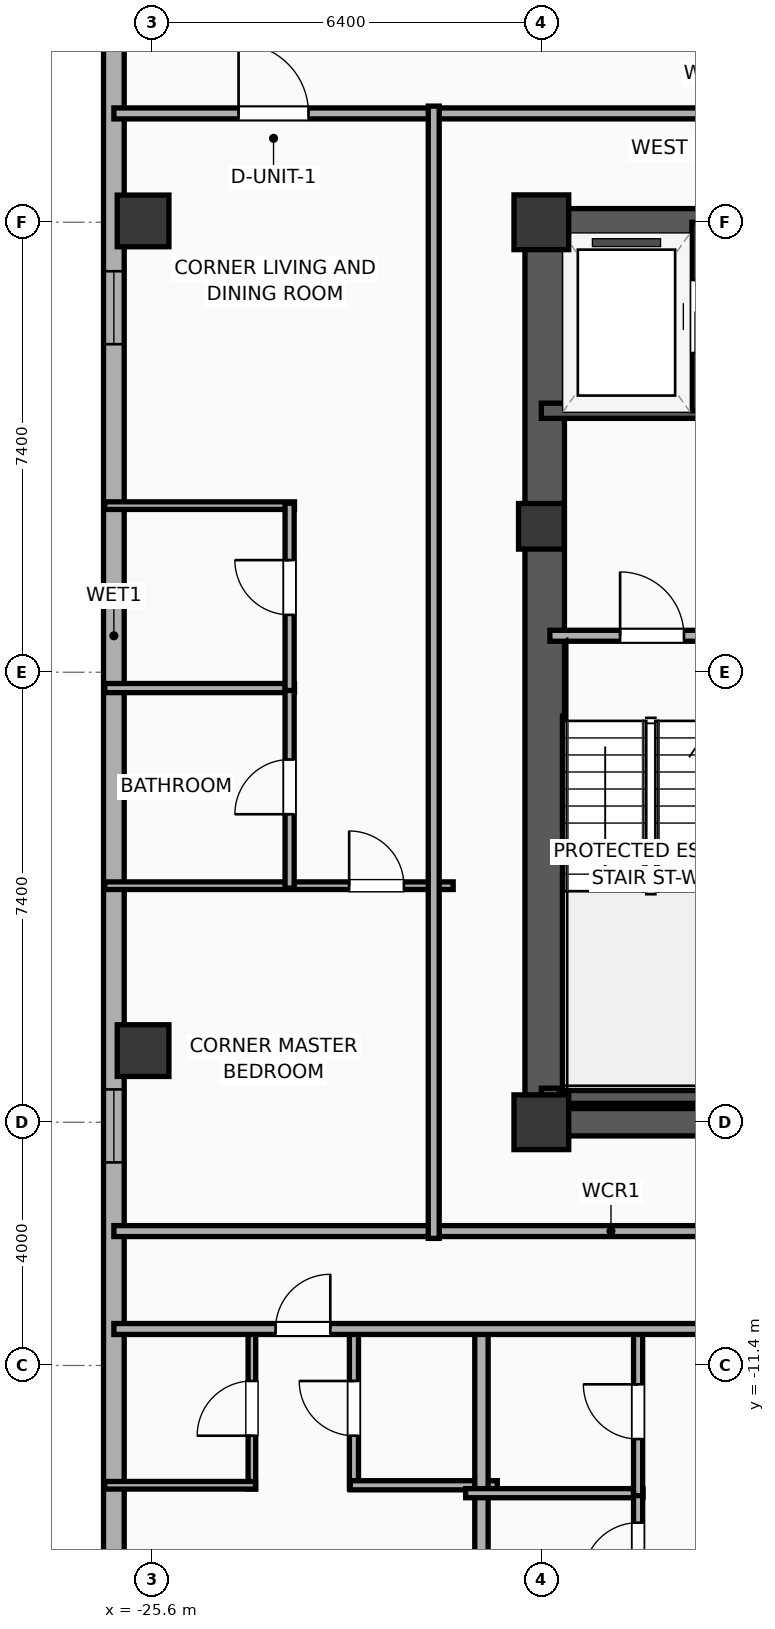
"""IFC4 building model, lengths in metres.
Left out: names, types, materials, properties, quantities, classifications, styles, units other than length and angle.
Written with IfcOpenShell. Run it as: python <this file> out.ifc"""

import sys

from ifc_helpers import new_model, si_unit, direction, frame, frame_2d, origin, origin_2d, place, context, subcontext, project, spatial, rectangle, hollow_rectangle, extrude, element, fill, save


model = new_model("IFC4")
c1 = context("Model", 3, precision=1e-05, world=origin(), true_north=direction((0.0, 1.0)))
c2 = subcontext(c1, "Body", "Model", "MODEL_VIEW")
j1 = project(units=[si_unit("LENGTHUNIT", "METRE"), si_unit("PLANEANGLEUNIT", "RADIAN")], contexts=[c1])
p1 = place(None, origin())
s1 = spatial("IfcSite", under=j1, at=p1, CompositionType="ELEMENT")
p2 = place(p1, origin())
s2 = spatial("IfcBuilding", under=s1, at=p2, CompositionType="ELEMENT")
p3 = place(p2, frame((0.0, 0.0, 219.7)))
s3 = spatial("IfcBuildingStorey", under=s2, at=p3, CompositionType="ELEMENT", Elevation=219.7)
p4 = place(p3, frame((-19.2, -7.4, 0.0), z_axis=(0.0, 0.0, 1.0), x_axis=(1.0, 0.0, 0.0)))
e1 = element("IfcColumn", 1, at=p4, inside=s3, PredefinedType="COLUMN", context=c2, shape_type="SweptSolid", body=[
    extrude(rectangle(XDim=0.9, YDim=0.9, at=origin_2d()), origin(), (0.0, 0.0, 1.0), 3.9),
])
p5 = place(p3, frame((-19.2, 2.4, 0.0), z_axis=(0.0, 0.0, 1.0), x_axis=(1.0, 0.0, 0.0)))
e2 = element("IfcColumn", 2, at=p5, inside=s3, PredefinedType="COLUMN", context=c2, shape_type="SweptSolid", body=[
    extrude(rectangle(XDim=0.75, YDim=0.75, at=origin_2d()), origin(), (0.0, 0.0, 1.0), 3.9),
])
p6 = place(p3, frame((-19.2, 7.4, 0.0), z_axis=(0.0, 0.0, 1.0), x_axis=(1.0, 0.0, 0.0)))
e3 = element("IfcColumn", 3, at=p6, inside=s3, PredefinedType="COLUMN", context=c2, shape_type="SweptSolid", body=[
    extrude(rectangle(XDim=0.9, YDim=0.9, at=origin_2d()), origin(), (0.0, 0.0, 1.0), 3.9),
])
for number, where, z_axis, x_axis in (
    (4, (-19.425, -7.4, 0.0), (0.0, 0.0, 1.0), (1.0, 0.0, 0.0)),
    (5, (-19.425, 7.4, 0.0), (0.0, 0.0, 1.0), (1.0, 0.0, 0.0)),
):
    element("IfcWall", number, at=place(p3, frame(where, z_axis=z_axis, x_axis=x_axis)), inside=s3, PredefinedType="SHEAR", context=c2, shape_type="SweptSolid", body=[
        extrude(rectangle(XDim=7.25, YDim=0.45, at=frame_2d((3.625, 0.0))), origin(), (0.0, 0.0, 1.0), 3.65),
    ])
p7 = place(p3, frame((-19.145, -7.4, 0.0), z_axis=(0.0, 0.0, 1.0), x_axis=(0.0, 1.0, 0.0)))
e6 = element("IfcWall", 6, at=p7, inside=s3, PredefinedType="SHEAR", context=c2, shape_type="SweptSolid", body=[
    extrude(rectangle(XDim=14.8, YDim=0.65, at=frame_2d((7.4, 0.0))), origin(), (0.0, 0.0, 1.0), 3.65),
])
p8 = place(p3, frame((-19.2, -6.965, 0.0), z_axis=(0.0, 0.0, 1.0), x_axis=(1.0, 0.0, 0.0)))
e7 = element("IfcWall", 7, at=p8, inside=s3, PredefinedType="SOLIDWALL", context=c2, shape_type="SweptSolid", body=[
    extrude(rectangle(XDim=3.46, YDim=0.25, at=frame_2d((1.73, 0.0))), origin(), (0.0, 0.0, 1.0), 3.65),
])
for number, where, z_axis, x_axis in (
    (8, (-25.75, 7.422, 0.0), (0.0, 0.0, 1.0), (1.0, 0.0, 0.0)),
    (9, (-25.75, -6.222, 0.0), (0.0, 0.0, 1.0), (1.0, 0.0, 0.0)),
):
    element("IfcColumn", number, at=place(p3, frame(where, z_axis=z_axis, x_axis=x_axis)), inside=s3, PredefinedType="COLUMN", context=c2, shape_type="SweptSolid", body=[
        extrude(hollow_rectangle(XDim=0.85, YDim=0.85, WallThickness=0.028, at=origin_2d()), origin(), (0.0, 0.0, 1.0), 3.9),
    ])
p9 = place(p3, frame((-26.23, -15.383, 0.0), z_axis=(0.0, 0.0, 1.0), x_axis=(0.0, 1.0, 0.0)))
e10 = element("IfcWall", 10, at=p9, inside=s3, PredefinedType="ELEMENTEDWALL", context=c2, shape_type="SweptSolid", body=[
    extrude(rectangle(XDim=31.967, YDim=0.34, at=frame_2d((15.983, 0.0))), origin(), (0.0, 0.0, 1.0), 3.65),
])
p10 = place(p9, frame((29.55, 0.0, 0.75)))
e11 = element("IfcOpeningElement", 11, at=p10, cuts=e10, PredefinedType="OPENING", context=c2, shape_type="SweptSolid", body=[
    extrude(rectangle(XDim=1.2, YDim=2.05, at=frame_2d((0.6, 1.025))), frame((0.0, 0.18, 0.0), z_axis=(0.0, -1.0, 0.0), x_axis=(1.0, 0.0, 0.0)), (0.0, 0.0, 1.0), 0.36),
])
p11 = place(p9, frame((20.778, 0.0, 0.75)))
e12 = element("IfcOpeningElement", 12, at=p11, cuts=e10, PredefinedType="OPENING", context=c2, shape_type="SweptSolid", body=[
    extrude(rectangle(XDim=1.2, YDim=2.05, at=frame_2d((0.6, 1.025))), frame((0.0, 0.18, 0.0), z_axis=(0.0, -1.0, 0.0), x_axis=(1.0, 0.0, 0.0)), (0.0, 0.0, 1.0), 0.36),
])
p12 = place(p9, frame((7.323, 0.0, 0.75)))
e13 = element("IfcOpeningElement", 13, at=p12, cuts=e10, PredefinedType="OPENING", context=c2, shape_type="SweptSolid", body=[
    extrude(rectangle(XDim=1.2, YDim=2.05, at=frame_2d((0.6, 1.025))), frame((0.0, 0.18, 0.0), z_axis=(0.0, -1.0, 0.0), x_axis=(1.0, 0.0, 0.0)), (0.0, 0.0, 1.0), 0.36),
])
p13 = place(p3, frame((-19.2, 4.3, 0.0), z_axis=(0.0, 0.0, 1.0), x_axis=(1.0, 0.0, 0.0)))
e14 = element("IfcWall", 14, at=p13, inside=s3, PredefinedType="SOLIDWALL", context=c2, shape_type="SweptSolid", body=[
    extrude(rectangle(XDim=2.6, YDim=0.25, at=frame_2d((1.3, 0.0))), origin(), (0.0, 0.0, 1.0), 3.65),
])
p14 = place(p3, frame((-16.6, 4.3, 0.0), z_axis=(0.0, 0.0, 1.0), x_axis=(0.0, 1.0, 0.0)))
e15 = element("IfcWall", 15, at=p14, inside=s3, PredefinedType="SOLIDWALL", context=c2, shape_type="SweptSolid", body=[
    extrude(rectangle(XDim=3.1, YDim=0.25, at=frame_2d((1.55, 0.0))), origin(), (0.0, 0.0, 1.0), 3.65),
])
p15 = place(p14, frame((0.95, 0.0, 0.0)))
e16 = element("IfcOpeningElement", 16, at=p15, cuts=e15, PredefinedType="OPENING", context=c2, shape_type="SweptSolid", body=[
    extrude(rectangle(XDim=1.2, YDim=2.05, at=frame_2d((0.6, 1.025))), frame((0.0, 0.135, 0.0), z_axis=(0.0, -1.0, 0.0), x_axis=(1.0, 0.0, 0.0)), (0.0, 0.0, 1.0), 0.27),
])
p16 = place(p3, frame((-19.06, 0.6, 0.0), z_axis=(0.0, 0.0, 1.0), x_axis=(1.0, 0.0, 0.0)))
e17 = element("IfcWall", 17, at=p16, inside=s3, PredefinedType="PARTITIONING", context=c2, shape_type="SweptSolid", body=[
    extrude(rectangle(XDim=3.36, YDim=0.18, at=frame_2d((1.68, 0.0))), origin(), (0.0, 0.0, 1.0), 3.65),
])
p17 = place(p16, frame((1.155, 0.0, 0.0)))
e18 = element("IfcOpeningElement", 18, at=p17, cuts=e17, PredefinedType="OPENING", context=c2, shape_type="SweptSolid", body=[
    extrude(rectangle(XDim=1.05, YDim=2.05, at=frame_2d((0.525, 1.025))), frame((0.0, 0.1, 0.0), z_axis=(0.0, -1.0, 0.0), x_axis=(1.0, 0.0, 0.0)), (0.0, 0.0, 1.0), 0.2),
])
p18 = place(p3, frame((-26.23, 9.19, 0.0), z_axis=(0.0, 0.0, 1.0), x_axis=(1.0, 0.0, 0.0)))
e19 = element("IfcWall", 19, at=p18, inside=s3, PredefinedType="PARTITIONING", context=c2, shape_type="SweptSolid", body=[
    extrude(rectangle(XDim=16.35, YDim=0.18, at=frame_2d((8.175, 0.0))), origin(), (0.0, 0.0, 1.0), 3.65),
])
p19 = place(p18, frame((2.051, 0.0, 0.0)))
e20 = element("IfcOpeningElement", 20, at=p19, cuts=e19, PredefinedType="OPENING", context=c2, shape_type="SweptSolid", body=[
    extrude(rectangle(XDim=1.15, YDim=2.05, at=frame_2d((0.575, 1.025))), frame((0.0, 0.1, 0.0), z_axis=(0.0, -1.0, 0.0), x_axis=(1.0, 0.0, 0.0)), (0.0, 0.0, 1.0), 0.2),
])
p20 = place(p3, frame((-26.23, -9.19, 0.0), z_axis=(0.0, 0.0, 1.0), x_axis=(1.0, 0.0, 0.0)))
e21 = element("IfcWall", 21, at=p20, inside=s3, PredefinedType="PARTITIONING", context=c2, shape_type="SweptSolid", body=[
    extrude(rectangle(XDim=16.35, YDim=0.18, at=frame_2d((8.175, 0.0))), origin(), (0.0, 0.0, 1.0), 3.65),
])
p21 = place(p3, frame((-23.96, -13.43, 0.0), z_axis=(0.0, 0.0, 1.0), x_axis=(0.0, 1.0, 0.0)))
e22 = element("IfcWall", 22, at=p21, inside=s3, PredefinedType="PARTITIONING", context=c2, shape_type="SweptSolid", body=[
    extrude(rectangle(XDim=2.65, YDim=0.125, at=frame_2d((1.325, 0.0))), origin(), (0.0, 0.0, 1.0), 3.65),
])
p22 = place(p21, frame((0.875, 0.0, 0.0)))
e23 = element("IfcOpeningElement", 23, at=p22, cuts=e22, PredefinedType="OPENING", context=c2, shape_type="SweptSolid", body=[
    extrude(rectangle(XDim=0.9, YDim=2.05, at=frame_2d((0.45, 1.025))), frame((0.0, 0.073, 0.0), z_axis=(0.0, -1.0, 0.0), x_axis=(1.0, 0.0, 0.0)), (0.0, 0.0, 1.0), 0.145),
])
p23 = place(p3, frame((-22.282, -13.43, 0.0), z_axis=(0.0, 0.0, 1.0), x_axis=(0.0, 1.0, 0.0)))
e24 = element("IfcWall", 24, at=p23, inside=s3, PredefinedType="PLUMBINGWALL", context=c2, shape_type="SweptSolid", body=[
    extrude(rectangle(XDim=2.65, YDim=0.15, at=frame_2d((1.325, 0.0))), origin(), (0.0, 0.0, 1.0), 3.65),
])
p24 = place(p23, frame((0.875, 0.0, 0.0)))
e25 = element("IfcOpeningElement", 25, at=p24, cuts=e24, PredefinedType="OPENING", context=c2, shape_type="SweptSolid", body=[
    extrude(rectangle(XDim=0.9, YDim=2.05, at=frame_2d((0.45, 1.025))), frame((0.0, 0.085, 0.0), z_axis=(0.0, -1.0, 0.0), x_axis=(1.0, 0.0, 0.0)), (0.0, 0.0, 1.0), 0.17),
])
p25 = place(p3, frame((-26.38, -13.37, 0.0), z_axis=(0.0, 0.0, 1.0), x_axis=(1.0, 0.0, 0.0)))
e26 = element("IfcWall", 26, at=p25, inside=s3, PredefinedType="PARTITIONING", context=c2, shape_type="SweptSolid", body=[
    extrude(rectangle(XDim=2.48, YDim=0.125, at=frame_2d((1.24, 0.0))), origin(), (0.0, 0.0, 1.0), 3.65),
])
p26 = place(p3, frame((-22.342, -13.37, 0.0), z_axis=(0.0, 0.0, 1.0), x_axis=(1.0, 0.0, 0.0)))
e27 = element("IfcWall", 27, at=p26, inside=s3, PredefinedType="PLUMBINGWALL", context=c2, shape_type="SweptSolid", body=[
    extrude(rectangle(XDim=2.417, YDim=0.15, at=frame_2d((1.208, 0.0))), origin(), (0.0, 0.0, 1.0), 3.65),
])
p27 = place(p3, frame((-20.185, -18.83, 0.0), z_axis=(0.0, 0.0, 1.0), x_axis=(0.0, 1.0, 0.0)))
e28 = element("IfcWall", 28, at=p27, inside=s3, PredefinedType="PARTITIONING", context=c2, shape_type="SweptSolid", body=[
    extrude(rectangle(XDim=8.11, YDim=0.22, at=frame_2d((4.055, 0.0))), origin(), (0.0, 0.0, 1.0), 3.09),
])
p28 = place(p3, frame((-20.445, -13.5, 0.0), z_axis=(0.0, 0.0, 1.0), x_axis=(1.0, 0.0, 0.0)))
e29 = element("IfcWall", 29, at=p28, inside=s3, PredefinedType="PLUMBINGWALL", context=c2, shape_type="SweptSolid", body=[
    extrude(rectangle(XDim=2.916, YDim=0.15, at=frame_2d((1.458, 0.0))), origin(), (0.0, 0.0, 1.0), 3.65),
])
p29 = place(p3, frame((-17.609, -18.877, 0.0), z_axis=(0.0, 0.0, 1.0), x_axis=(0.0, 1.0, 0.0)))
e30 = element("IfcWall", 30, at=p29, inside=s3, PredefinedType="PLUMBINGWALL", context=c2, shape_type="SweptSolid", body=[
    extrude(rectangle(XDim=5.417, YDim=0.15, at=frame_2d((2.708, 0.0))), origin(), (0.0, 0.0, 1.0), 3.65),
])
p30 = place(p29, frame((3.992, 0.0, 0.0)))
e31 = element("IfcOpeningElement", 31, at=p30, cuts=e30, PredefinedType="OPENING", context=c2, shape_type="SweptSolid", body=[
    extrude(rectangle(XDim=0.9, YDim=2.05, at=frame_2d((0.45, 1.025))), frame((0.0, 0.085, 0.0), z_axis=(0.0, -1.0, 0.0), x_axis=(1.0, 0.0, 0.0)), (0.0, 0.0, 1.0), 0.17),
])
p31 = place(p3, frame((-17.609, -13.54, 0.0), z_axis=(0.0, 0.0, 1.0), x_axis=(0.0, 1.0, 0.0)))
e32 = element("IfcWall", 32, at=p31, inside=s3, PredefinedType="PLUMBINGWALL", context=c2, shape_type="SweptSolid", body=[
    extrude(rectangle(XDim=2.76, YDim=0.15, at=frame_2d((1.38, 0.0))), origin(), (0.0, 0.0, 1.0), 3.65),
])
p32 = place(p31, frame((0.93, 0.0, 0.0)))
e33 = element("IfcOpeningElement", 33, at=p32, cuts=e32, PredefinedType="OPENING", context=c2, shape_type="SweptSolid", body=[
    extrude(rectangle(XDim=0.9, YDim=2.05, at=frame_2d((0.45, 1.025))), frame((0.0, 0.085, 0.0), z_axis=(0.0, -1.0, 0.0), x_axis=(1.0, 0.0, 0.0)), (0.0, 0.0, 1.0), 0.17),
])
p33 = place(p3, frame((-26.23, -10.8, 0.0), z_axis=(0.0, 0.0, 1.0), x_axis=(1.0, 0.0, 0.0)))
e34 = element("IfcWall", 34, at=p33, inside=s3, PredefinedType="PARTITIONING", context=c2, shape_type="SweptSolid", body=[
    extrude(rectangle(XDim=18.15, YDim=0.18, at=frame_2d((9.075, 0.0))), origin(), (0.0, 0.0, 1.0), 3.65),
])
p34 = place(p33, frame((2.659, 0.0, 0.0)))
e35 = element("IfcOpeningElement", 35, at=p34, cuts=e34, PredefinedType="OPENING", context=c2, shape_type="SweptSolid", body=[
    extrude(rectangle(XDim=0.9, YDim=2.05, at=frame_2d((0.45, 1.025))), frame((0.0, 0.1, 0.0), z_axis=(0.0, -1.0, 0.0), x_axis=(1.0, 0.0, 0.0)), (0.0, 0.0, 1.0), 0.2),
])
p35 = place(p33, frame((9.754, 0.0, 0.0)))
e36 = element("IfcOpeningElement", 36, at=p35, cuts=e34, PredefinedType="OPENING", context=c2, shape_type="SweptSolid", body=[
    extrude(rectangle(XDim=1.15, YDim=2.05, at=frame_2d((0.575, 1.025))), frame((0.0, 0.1, 0.0), z_axis=(0.0, -1.0, 0.0), x_axis=(1.0, 0.0, 0.0)), (0.0, 0.0, 1.0), 0.2),
])
p36 = place(p33, frame((14.792, 0.0, 0.0)))
e37 = element("IfcOpeningElement", 37, at=p36, cuts=e34, PredefinedType="OPENING", context=c2, shape_type="SweptSolid", body=[
    extrude(rectangle(XDim=0.9, YDim=2.05, at=frame_2d((0.45, 1.025))), frame((0.0, 0.1, 0.0), z_axis=(0.0, -1.0, 0.0), x_axis=(1.0, 0.0, 0.0)), (0.0, 0.0, 1.0), 0.2),
])
p37 = place(p3, frame((-26.38, 2.74, 0.0), z_axis=(0.0, 0.0, 1.0), x_axis=(1.0, 0.0, 0.0)))
e38 = element("IfcWall", 38, at=p37, inside=s3, PredefinedType="PARTITIONING", context=c2, shape_type="SweptSolid", body=[
    extrude(rectangle(XDim=3.12, YDim=0.125, at=frame_2d((1.56, 0.0))), origin(), (0.0, 0.0, 1.0), 3.65),
])
p38 = place(p3, frame((-26.38, -0.26, 0.0), z_axis=(0.0, 0.0, 1.0), x_axis=(1.0, 0.0, 0.0)))
e39 = element("IfcWall", 39, at=p38, inside=s3, PredefinedType="PLUMBINGWALL", context=c2, shape_type="SweptSolid", body=[
    extrude(rectangle(XDim=3.12, YDim=0.15, at=frame_2d((1.56, 0.0))), origin(), (0.0, 0.0, 1.0), 3.65),
])
p39 = place(p3, frame((-26.38, -3.51, 0.0), z_axis=(0.0, 0.0, 1.0), x_axis=(1.0, 0.0, 0.0)))
e40 = element("IfcWall", 40, at=p39, inside=s3, PredefinedType="PARTITIONING", context=c2, shape_type="SweptSolid", body=[
    extrude(rectangle(XDim=5.73, YDim=0.125, at=frame_2d((2.865, 0.0))), origin(), (0.0, 0.0, 1.0), 3.65),
])
p40 = place(p39, frame((4.019, 0.0, 0.0)))
e41 = element("IfcOpeningElement", 41, at=p40, cuts=e40, PredefinedType="OPENING", context=c2, shape_type="SweptSolid", body=[
    extrude(rectangle(XDim=0.9, YDim=2.05, at=frame_2d((0.45, 1.025))), frame((0.0, 0.073, 0.0), z_axis=(0.0, -1.0, 0.0), x_axis=(1.0, 0.0, 0.0)), (0.0, 0.0, 1.0), 0.145),
])
p41 = place(p3, frame((-23.34, -3.55, 0.0), z_axis=(0.0, 0.0, 1.0), x_axis=(0.0, 1.0, 0.0)))
e42 = element("IfcWall", 42, at=p41, inside=s3, PredefinedType="PLUMBINGWALL", context=c2, shape_type="SweptSolid", body=[
    extrude(rectangle(XDim=3.33, YDim=0.15, at=frame_2d((1.665, 0.0))), origin(), (0.0, 0.0, 1.0), 3.65),
])
p42 = place(p41, frame((1.215, 0.0, 0.0)))
e43 = element("IfcOpeningElement", 43, at=p42, cuts=e42, PredefinedType="OPENING", context=c2, shape_type="SweptSolid", body=[
    extrude(rectangle(XDim=0.9, YDim=2.05, at=frame_2d((0.45, 1.025))), frame((0.0, 0.085, 0.0), z_axis=(0.0, -1.0, 0.0), x_axis=(1.0, 0.0, 0.0)), (0.0, 0.0, 1.0), 0.17),
])
p43 = place(p3, frame((-23.34, -0.3, 0.0), z_axis=(0.0, 0.0, 1.0), x_axis=(0.0, 1.0, 0.0)))
e44 = element("IfcWall", 44, at=p43, inside=s3, PredefinedType="PLUMBINGWALL", context=c2, shape_type="SweptSolid", body=[
    extrude(rectangle(XDim=3.08, YDim=0.15, at=frame_2d((1.54, 0.0))), origin(), (0.0, 0.0, 1.0), 3.65),
])
p44 = place(p43, frame((1.244, 0.0, 0.0)))
e45 = element("IfcOpeningElement", 45, at=p44, cuts=e44, PredefinedType="OPENING", context=c2, shape_type="SweptSolid", body=[
    extrude(rectangle(XDim=0.9, YDim=2.05, at=frame_2d((0.45, 1.025))), frame((0.0, 0.085, 0.0), z_axis=(0.0, -1.0, 0.0), x_axis=(1.0, 0.0, 0.0)), (0.0, 0.0, 1.0), 0.17),
])
p45 = place(p3, frame((-20.97, -9.31, 0.0), z_axis=(0.0, 0.0, 1.0), x_axis=(0.0, 1.0, 0.0)))
e46 = element("IfcWall", 46, at=p45, inside=s3, PredefinedType="PARTITIONING", context=c2, shape_type="SweptSolid", body=[
    extrude(rectangle(XDim=18.62, YDim=0.18, at=frame_2d((9.31, 0.0))), origin(), (0.0, 0.0, 1.0), 3.65),
])
p46 = place(p11, origin())
e47 = element("IfcWindow", 47, at=p46, inside=s3, PartitioningType="SINGLE_PANEL", PredefinedType="WINDOW", context=c2, shape_type="SweptSolid", body=[
    extrude(rectangle(XDim=1.2, YDim=2.05, at=frame_2d((0.6, 1.025))), frame((0.0, 0.03, 0.0), z_axis=(0.0, -1.0, 0.0), x_axis=(1.0, 0.0, 0.0)), (0.0, 0.0, 1.0), 0.06),
])
fill(e12, e47)
p47 = place(p12, origin())
e48 = element("IfcWindow", 48, at=p47, inside=s3, PartitioningType="SINGLE_PANEL", PredefinedType="WINDOW", context=c2, shape_type="SweptSolid", body=[
    extrude(rectangle(XDim=1.2, YDim=2.05, at=frame_2d((0.6, 1.025))), frame((0.0, 0.03, 0.0), z_axis=(0.0, -1.0, 0.0), x_axis=(1.0, 0.0, 0.0)), (0.0, 0.0, 1.0), 0.06),
])
fill(e13, e48)
p48 = place(p17, origin())
e49 = element("IfcDoor", 49, at=p48, inside=s3, OperationType="SINGLE_SWING_LEFT", PredefinedType="DOOR", context=c2, shape_type="SweptSolid", body=[
    extrude(rectangle(XDim=1.05, YDim=2.05, at=frame_2d((0.525, 1.025))), frame((0.0, 0.025, 0.0), z_axis=(0.0, -1.0, 0.0), x_axis=(1.0, 0.0, 0.0)), (0.0, 0.0, 1.0), 0.05),
])
fill(e18, e49)
p49 = place(p19, origin())
e50 = element("IfcDoor", 50, at=p49, inside=s3, OperationType="SINGLE_SWING_LEFT", PredefinedType="DOOR", context=c2, shape_type="SweptSolid", body=[
    extrude(rectangle(XDim=1.15, YDim=2.05, at=frame_2d((0.575, 1.025))), frame((0.0, 0.025, 0.0), z_axis=(0.0, -1.0, 0.0), x_axis=(1.0, 0.0, 0.0)), (0.0, 0.0, 1.0), 0.05),
])
fill(e20, e50)
p50 = place(p22, origin())
e51 = element("IfcDoor", 51, at=p50, inside=s3, OperationType="SINGLE_SWING_LEFT", PredefinedType="DOOR", context=c2, shape_type="SweptSolid", body=[
    extrude(rectangle(XDim=0.9, YDim=2.05, at=frame_2d((0.45, 1.025))), frame((0.0, 0.025, 0.0), z_axis=(0.0, -1.0, 0.0), x_axis=(1.0, 0.0, 0.0)), (0.0, 0.0, 1.0), 0.05),
])
fill(e23, e51)
p51 = place(p24, origin())
e52 = element("IfcDoor", 52, at=p51, inside=s3, OperationType="SINGLE_SWING_RIGHT", PredefinedType="DOOR", context=c2, shape_type="SweptSolid", body=[
    extrude(rectangle(XDim=0.9, YDim=2.05, at=frame_2d((0.45, 1.025))), frame((0.0, 0.025, 0.0), z_axis=(0.0, -1.0, 0.0), x_axis=(1.0, 0.0, 0.0)), (0.0, 0.0, 1.0), 0.05),
])
fill(e25, e52)
p52 = place(p30, origin())
e53 = element("IfcDoor", 53, at=p52, inside=s3, OperationType="SINGLE_SWING_LEFT", PredefinedType="DOOR", context=c2, shape_type="SweptSolid", body=[
    extrude(rectangle(XDim=0.9, YDim=2.05, at=frame_2d((0.45, 1.025))), frame((0.0, 0.025, 0.0), z_axis=(0.0, -1.0, 0.0), x_axis=(1.0, 0.0, 0.0)), (0.0, 0.0, 1.0), 0.05),
])
fill(e31, e53)
p53 = place(p32, origin())
e54 = element("IfcDoor", 54, at=p53, inside=s3, OperationType="SINGLE_SWING_RIGHT", PredefinedType="DOOR", context=c2, shape_type="SweptSolid", body=[
    extrude(rectangle(XDim=0.9, YDim=2.05, at=frame_2d((0.45, 1.025))), frame((0.0, 0.025, 0.0), z_axis=(0.0, -1.0, 0.0), x_axis=(1.0, 0.0, 0.0)), (0.0, 0.0, 1.0), 0.05),
])
fill(e33, e54)
p54 = place(p34, origin())
e55 = element("IfcDoor", 55, at=p54, inside=s3, OperationType="SINGLE_SWING_RIGHT", PredefinedType="DOOR", context=c2, shape_type="SweptSolid", body=[
    extrude(rectangle(XDim=0.9, YDim=2.05, at=frame_2d((0.45, 1.025))), frame((0.0, 0.025, 0.0), z_axis=(0.0, -1.0, 0.0), x_axis=(1.0, 0.0, 0.0)), (0.0, 0.0, 1.0), 0.05),
])
fill(e35, e55)
p55 = place(p40, origin())
e56 = element("IfcDoor", 56, at=p55, inside=s3, OperationType="SINGLE_SWING_LEFT", PredefinedType="DOOR", context=c2, shape_type="SweptSolid", body=[
    extrude(rectangle(XDim=0.9, YDim=2.05, at=frame_2d((0.45, 1.025))), frame((0.0, 0.025, 0.0), z_axis=(0.0, -1.0, 0.0), x_axis=(1.0, 0.0, 0.0)), (0.0, 0.0, 1.0), 0.05),
])
fill(e41, e56)
p56 = place(p42, origin())
e57 = element("IfcDoor", 57, at=p56, inside=s3, OperationType="SINGLE_SWING_LEFT", PredefinedType="DOOR", context=c2, shape_type="SweptSolid", body=[
    extrude(rectangle(XDim=0.9, YDim=2.05, at=frame_2d((0.45, 1.025))), frame((0.0, 0.025, 0.0), z_axis=(0.0, -1.0, 0.0), x_axis=(1.0, 0.0, 0.0)), (0.0, 0.0, 1.0), 0.05),
])
fill(e43, e57)
p57 = place(p44, origin())
e58 = element("IfcDoor", 58, at=p57, inside=s3, OperationType="SINGLE_SWING_RIGHT", PredefinedType="DOOR", context=c2, shape_type="SweptSolid", body=[
    extrude(rectangle(XDim=0.9, YDim=2.05, at=frame_2d((0.45, 1.025))), frame((0.0, 0.025, 0.0), z_axis=(0.0, -1.0, 0.0), x_axis=(1.0, 0.0, 0.0)), (0.0, 0.0, 1.0), 0.05),
])
fill(e45, e58)
save(model, sys.argv[1])
